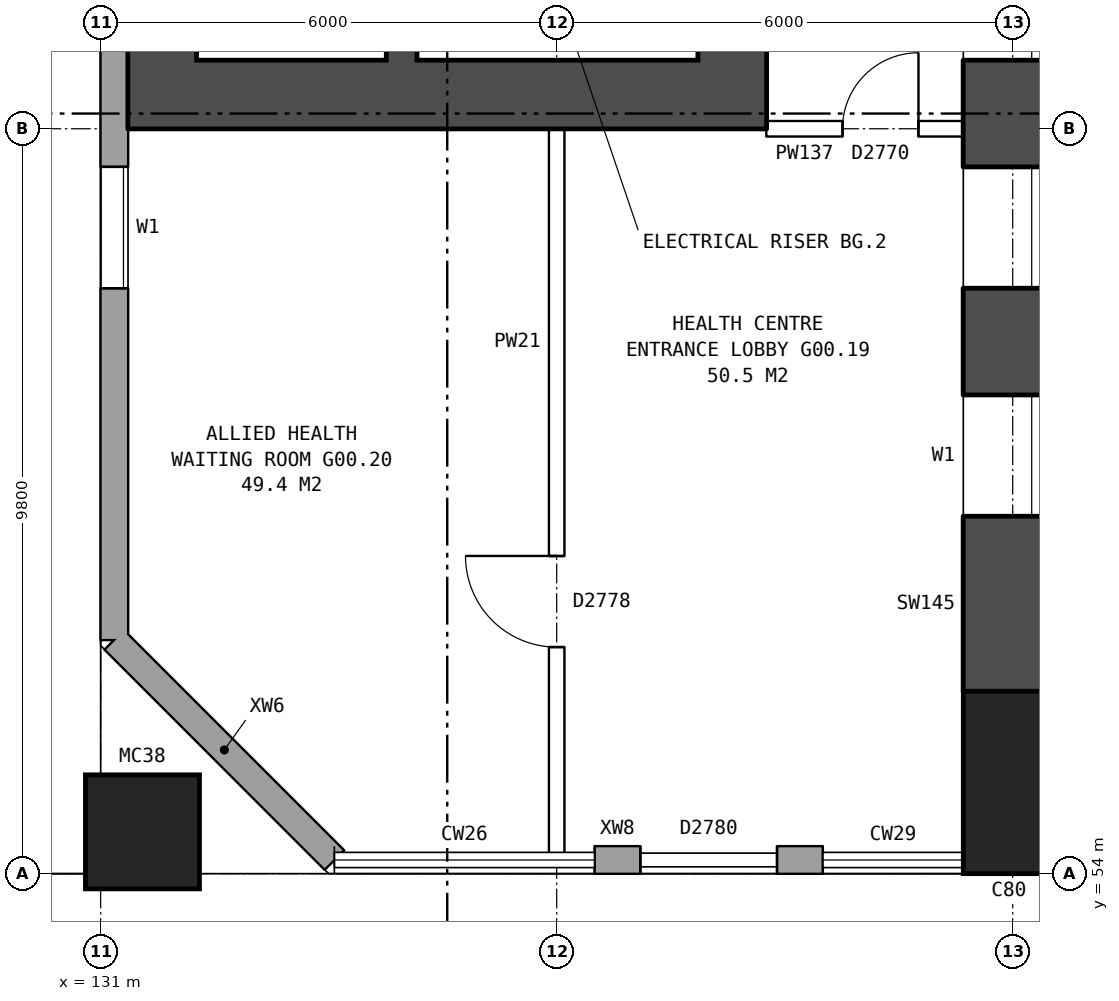
"""IFC4 building model, lengths in metres.
Left out: names, types, materials, properties, quantities, classifications, styles, units other than length and angle.
Written with IfcOpenShell. Run it as: python <this file> out.ifc"""

import sys

from ifc_helpers import new_model, si_unit, direction, frame, frame_2d, origin, origin_2d, place, context, subcontext, project, spatial, rectangle, hollow_rectangle, extrude, element, fill, save


model = new_model("IFC4")
c1 = context("Model", 3, precision=1e-05, world=origin(), true_north=direction((0.0, 1.0)))
c2 = subcontext(c1, "Body", "Model", "MODEL_VIEW")
j1 = project(units=[si_unit("LENGTHUNIT", "METRE"), si_unit("PLANEANGLEUNIT", "RADIAN")], contexts=[c1])
p1 = place(None, origin())
s1 = spatial("IfcSite", under=j1, at=p1, CompositionType="ELEMENT")
p2 = place(p1, origin())
s2 = spatial("IfcBuilding", under=s1, at=p2, CompositionType="ELEMENT")
p3 = place(p2, origin())
s3 = spatial("IfcBuildingStorey", under=s2, at=p3, CompositionType="ELEMENT", Elevation=0.0)
p4 = place(p3, frame((142.95, 55.2, -0.35), z_axis=(0.0, 0.0, 1.0), x_axis=(1.0, 0.0, 0.0)))
e1 = element("IfcColumn", 1, at=p4, inside=s3, PredefinedType="COLUMN", context=c2, shape_type="SweptSolid", body=[
    extrude(rectangle(XDim=1.2, YDim=2.4, at=origin_2d()), origin(), (0.0, 0.0, 1.0), 5.55),
])
p5 = place(p3, frame((142.95, 56.4, -0.35), z_axis=(0.0, 0.0, 1.0), x_axis=(0.0, 1.0, 0.0)))
e2 = element("IfcWall", 2, at=p5, inside=s3, PredefinedType="SHEAR", context=c2, shape_type="SweptSolid", body=[
    extrude(rectangle(XDim=27.2, YDim=1.2, at=frame_2d((13.6, 0.0))), origin(), (0.0, 0.0, 1.0), 5.55),
])
p6 = place(p5, frame((2.3, 0.0, 0.8)))
e3 = element("IfcOpeningElement", 3, at=p6, cuts=e2, PredefinedType="OPENING", context=c2, shape_type="SweptSolid", body=[
    extrude(rectangle(XDim=1.6, YDim=1.8, at=frame_2d((0.8, 0.9))), frame((0.0, 0.61, 0.0), z_axis=(0.0, -1.0, 0.0), x_axis=(1.0, 0.0, 0.0)), (0.0, 0.0, 1.0), 1.22),
])
p7 = place(p5, frame((5.3, 0.0, 0.8)))
e4 = element("IfcOpeningElement", 4, at=p7, cuts=e2, PredefinedType="OPENING", context=c2, shape_type="SweptSolid", body=[
    extrude(rectangle(XDim=1.6, YDim=1.8, at=frame_2d((0.8, 0.9))), frame((0.0, 0.61, 0.0), z_axis=(0.0, -1.0, 0.0), x_axis=(1.0, 0.0, 0.0)), (0.0, 0.0, 1.0), 1.22),
])
p8 = place(p5, frame((8.3, 0.0, 0.8)))
e5 = element("IfcOpeningElement", 5, at=p8, cuts=e2, PredefinedType="OPENING", context=c2, shape_type="SweptSolid", body=[
    extrude(rectangle(XDim=1.6, YDim=1.8, at=frame_2d((0.8, 0.9))), frame((0.0, 0.61, 0.0), z_axis=(0.0, -1.0, 0.0), x_axis=(1.0, 0.0, 0.0)), (0.0, 0.0, 1.0), 1.22),
])
p9 = place(p5, frame((11.3, 0.0, 0.8)))
e6 = element("IfcOpeningElement", 6, at=p9, cuts=e2, PredefinedType="OPENING", context=c2, shape_type="SweptSolid", body=[
    extrude(rectangle(XDim=1.6, YDim=1.8, at=frame_2d((0.8, 0.9))), frame((0.0, 0.61, 0.0), z_axis=(0.0, -1.0, 0.0), x_axis=(1.0, 0.0, 0.0)), (0.0, 0.0, 1.0), 1.22),
])
p10 = place(p5, frame((14.3, 0.0, 0.8)))
e7 = element("IfcOpeningElement", 7, at=p10, cuts=e2, PredefinedType="OPENING", context=c2, shape_type="SweptSolid", body=[
    extrude(rectangle(XDim=1.6, YDim=1.8, at=frame_2d((0.8, 0.9))), frame((0.0, 0.61, 0.0), z_axis=(0.0, -1.0, 0.0), x_axis=(1.0, 0.0, 0.0)), (0.0, 0.0, 1.0), 1.22),
])
p11 = place(p5, frame((17.3, 0.0, 0.8)))
e8 = element("IfcOpeningElement", 8, at=p11, cuts=e2, PredefinedType="OPENING", context=c2, shape_type="SweptSolid", body=[
    extrude(rectangle(XDim=1.6, YDim=1.8, at=frame_2d((0.8, 0.9))), frame((0.0, 0.61, 0.0), z_axis=(0.0, -1.0, 0.0), x_axis=(1.0, 0.0, 0.0)), (0.0, 0.0, 1.0), 1.22),
])
p12 = place(p5, frame((20.3, 0.0, 0.8)))
e9 = element("IfcOpeningElement", 9, at=p12, cuts=e2, PredefinedType="OPENING", context=c2, shape_type="SweptSolid", body=[
    extrude(rectangle(XDim=1.6, YDim=1.8, at=frame_2d((0.8, 0.9))), frame((0.0, 0.61, 0.0), z_axis=(0.0, -1.0, 0.0), x_axis=(1.0, 0.0, 0.0)), (0.0, 0.0, 1.0), 1.22),
])
p13 = place(p5, frame((23.3, 0.0, 0.8)))
e10 = element("IfcOpeningElement", 10, at=p13, cuts=e2, PredefinedType="OPENING", context=c2, shape_type="SweptSolid", body=[
    extrude(rectangle(XDim=1.6, YDim=1.8, at=frame_2d((0.8, 0.9))), frame((0.0, 0.61, 0.0), z_axis=(0.0, -1.0, 0.0), x_axis=(1.0, 0.0, 0.0)), (0.0, 0.0, 1.0), 1.22),
])
p14 = place(p3, frame((131.55, 54.55, -0.35), z_axis=(0.0, 0.0, 1.0), x_axis=(1.0, 0.0, 0.0)))
e11 = element("IfcColumn", 11, at=p14, inside=s3, PredefinedType="COLUMN", context=c2, shape_type="SweptSolid", body=[
    extrude(hollow_rectangle(XDim=1.5, YDim=1.5, WallThickness=0.08, at=origin_2d()), origin(), (0.0, 0.0, 1.0), 5.85),
])
p15 = place(p3, frame((131.18, 57.075, 0.0), z_axis=(0.0, 0.0, 1.0), x_axis=(0.707106781187, -0.707106781187, 0.0)))
e12 = element("IfcWall", 12, at=p15, inside=s3, PredefinedType="STANDARD", context=c2, shape_type="SweptSolid", body=[
    extrude(rectangle(XDim=4.094, YDim=0.36, at=frame_2d((2.047, 0.0))), origin(), (0.0, 0.0, 1.0), 5.2),
])
p16 = place(p3, frame((137.5, 54.18, 0.0), z_axis=(0.0, 0.0, 1.0), x_axis=(1.0, 0.0, 0.0)))
e13 = element("IfcWall", 13, at=p16, inside=s3, PredefinedType="STANDARD", context=c2, shape_type="SweptSolid", body=[
    extrude(rectangle(XDim=3.0, YDim=0.36, at=frame_2d((1.5, 0.0))), origin(), (0.0, 0.0, 1.0), 5.2),
])
p17 = place(p16, frame((0.6, 0.0, 0.0)))
e14 = element("IfcOpeningElement", 14, at=p17, cuts=e13, PredefinedType="OPENING", context=c2, shape_type="SweptSolid", body=[
    extrude(rectangle(XDim=1.8, YDim=2.4, at=frame_2d((0.9, 1.2))), frame((0.0, 0.19, 0.0), z_axis=(0.0, -1.0, 0.0), x_axis=(1.0, 0.0, 0.0)), (0.0, 0.0, 1.0), 0.38),
])
p18 = place(p3, frame((131.18, 82.925, 0.0), z_axis=(0.0, 0.0, 1.0), x_axis=(0.0, -1.0, 0.0)))
e15 = element("IfcWall", 15, at=p18, inside=s3, PredefinedType="STANDARD", context=c2, shape_type="SweptSolid", body=[
    extrude(rectangle(XDim=25.851, YDim=0.36, at=frame_2d((12.925, 0.0))), origin(), (0.0, 0.0, 1.0), 5.2),
])
p19 = place(p18, frame((19.625, 0.0, 0.8)))
e16 = element("IfcOpeningElement", 16, at=p19, cuts=e15, PredefinedType="OPENING", context=c2, shape_type="SweptSolid", body=[
    extrude(rectangle(XDim=1.6, YDim=1.8, at=frame_2d((0.8, 0.9))), frame((0.0, 0.19, 0.0), z_axis=(0.0, -1.0, 0.0), x_axis=(1.0, 0.0, 0.0)), (0.0, 0.0, 1.0), 0.38),
])
p20 = place(p18, frame((8.125, 0.0, 0.0)))
e17 = element("IfcOpeningElement", 17, at=p20, cuts=e15, PredefinedType="OPENING", context=c2, shape_type="SweptSolid", body=[
    extrude(rectangle(XDim=1.1, YDim=2.1, at=frame_2d((0.55, 1.05))), frame((0.0, 0.19, 0.0), z_axis=(0.0, -1.0, 0.0), x_axis=(1.0, 0.0, 0.0)), (0.0, 0.0, 1.0), 0.38),
])
p21 = place(p3, frame((139.31, 64.7, 0.0), z_axis=(0.0, 0.0, 1.0), x_axis=(0.0, 1.0, 0.0)))
e18 = element("IfcWall", 18, at=p21, inside=s3, PredefinedType="SHEAR", context=c2, shape_type="SweptSolid", body=[
    extrude(rectangle(XDim=10.6, YDim=0.9, at=frame_2d((5.3, 0.0))), origin(), (0.0, 0.0, 1.0), 5.2),
])
p22 = place(p21, frame((0.425, 0.0, 0.0)))
e19 = element("IfcOpeningElement", 19, at=p22, cuts=e18, PredefinedType="OPENING", context=c2, shape_type="SweptSolid", body=[
    extrude(rectangle(XDim=1.1, YDim=2.1, at=frame_2d((0.55, 1.05))), frame((0.0, 0.46, 0.0), z_axis=(0.0, -1.0, 0.0), x_axis=(1.0, 0.0, 0.0)), (0.0, 0.0, 1.0), 0.92),
])
p23 = place(p21, frame((2.7, 0.0, 0.0)))
e20 = element("IfcOpeningElement", 20, at=p23, cuts=e18, PredefinedType="OPENING", context=c2, shape_type="SweptSolid", body=[
    extrude(rectangle(XDim=1.1, YDim=2.1, at=frame_2d((0.55, 1.05))), frame((0.0, 0.46, 0.0), z_axis=(0.0, -1.0, 0.0), x_axis=(1.0, 0.0, 0.0)), (0.0, 0.0, 1.0), 0.92),
])
p24 = place(p21, frame((4.9, 0.0, 0.0)))
e21 = element("IfcOpeningElement", 21, at=p24, cuts=e18, PredefinedType="OPENING", context=c2, shape_type="SweptSolid", body=[
    extrude(rectangle(XDim=1.1, YDim=2.1, at=frame_2d((0.55, 1.05))), frame((0.0, 0.46, 0.0), z_axis=(0.0, -1.0, 0.0), x_axis=(1.0, 0.0, 0.0)), (0.0, 0.0, 1.0), 0.92),
])
p25 = place(p21, frame((9.0, 0.0, 0.0)))
e22 = element("IfcOpeningElement", 22, at=p25, cuts=e18, PredefinedType="OPENING", context=c2, shape_type="SweptSolid", body=[
    extrude(rectangle(XDim=1.1, YDim=2.1, at=frame_2d((0.55, 1.05))), frame((0.0, 0.46, 0.0), z_axis=(0.0, -1.0, 0.0), x_axis=(1.0, 0.0, 0.0)), (0.0, 0.0, 1.0), 0.92),
])
p26 = place(p21, frame((7.225, 0.0, 0.0)))
e23 = element("IfcOpeningElement", 23, at=p26, cuts=e18, PredefinedType="OPENING", context=c2, shape_type="SweptSolid", body=[
    extrude(rectangle(XDim=0.85, YDim=2.1, at=frame_2d((0.425, 1.05))), frame((0.0, 0.46, 0.0), z_axis=(0.0, -1.0, 0.0), x_axis=(1.0, 0.0, 0.0)), (0.0, 0.0, 1.0), 0.92),
])
p27 = place(p3, frame((131.81, 64.7, 0.0), z_axis=(0.0, 0.0, 1.0), x_axis=(0.0, 1.0, 0.0)))
e24 = element("IfcWall", 24, at=p27, inside=s3, PredefinedType="SHEAR", context=c2, shape_type="SweptSolid", body=[
    extrude(rectangle(XDim=10.6, YDim=0.9, at=frame_2d((5.3, 0.0))), origin(), (0.0, 0.0, 1.0), 5.2),
])
p28 = place(p27, frame((9.0, 0.0, 0.0)))
e25 = element("IfcOpeningElement", 25, at=p28, cuts=e24, PredefinedType="OPENING", context=c2, shape_type="SweptSolid", body=[
    extrude(rectangle(XDim=1.1, YDim=2.1, at=frame_2d((0.55, 1.05))), frame((0.0, 0.46, 0.0), z_axis=(0.0, -1.0, 0.0), x_axis=(1.0, 0.0, 0.0)), (0.0, 0.0, 1.0), 0.92),
])
p29 = place(p3, frame((139.76, 64.25, 0.0), z_axis=(0.0, 0.0, 1.0), x_axis=(-1.0, 0.0, 0.0)))
e26 = element("IfcWall", 26, at=p29, inside=s3, PredefinedType="SHEAR", context=c2, shape_type="SweptSolid", body=[
    extrude(rectangle(XDim=8.4, YDim=0.9, at=frame_2d((4.2, 0.0))), origin(), (0.0, 0.0, 1.0), 5.2),
])
p30 = place(p3, frame((134.96, 64.7, 0.0), z_axis=(0.0, 0.0, 1.0), x_axis=(0.0, 1.0, 0.0)))
e27 = element("IfcWall", 27, at=p30, inside=s3, PredefinedType="SHEAR", context=c2, shape_type="SweptSolid", body=[
    extrude(rectangle(XDim=6.35, YDim=0.4, at=frame_2d((3.175, 0.0))), origin(), (0.0, 0.0, 1.0), 5.2),
])
p31 = place(p3, frame((139.76, 63.8, 0.0), z_axis=(0.0, 0.0, 1.0), x_axis=(1.0, 0.0, 0.0)))
e28 = element("IfcWall", 28, at=p31, inside=s3, PredefinedType="PARTITIONING", context=c2, shape_type="SweptSolid", body=[
    extrude(rectangle(XDim=2.59, YDim=0.2, at=frame_2d((1.295, 0.0))), origin(), (0.0, 0.0, 1.0), 5.2),
])
p32 = place(p31, frame((1.0, 0.0, 0.0)))
e29 = element("IfcOpeningElement", 29, at=p32, cuts=e28, PredefinedType="OPENING", context=c2, shape_type="SweptSolid", body=[
    extrude(rectangle(XDim=1.0, YDim=2.1, at=frame_2d((0.5, 1.05))), frame((0.0, 0.11, 0.0), z_axis=(0.0, -1.0, 0.0), x_axis=(1.0, 0.0, 0.0)), (0.0, 0.0, 1.0), 0.22),
])
p33 = place(p3, frame((137.0, 54.24, 0.0), z_axis=(0.0, 0.0, 1.0), x_axis=(0.0, 1.0, 0.0)))
e30 = element("IfcWall", 30, at=p33, inside=s3, PredefinedType="PARTITIONING", context=c2, shape_type="SweptSolid", body=[
    extrude(rectangle(XDim=9.56, YDim=0.2, at=frame_2d((4.78, 0.0))), origin(), (0.0, 0.0, 1.0), 5.2),
])
p34 = place(p33, frame((2.74, 0.0, 0.0)))
e31 = element("IfcOpeningElement", 31, at=p34, cuts=e30, PredefinedType="OPENING", context=c2, shape_type="SweptSolid", body=[
    extrude(rectangle(XDim=1.2, YDim=2.1, at=frame_2d((0.6, 1.05))), frame((0.0, 0.11, 0.0), z_axis=(0.0, -1.0, 0.0), x_axis=(1.0, 0.0, 0.0)), (0.0, 0.0, 1.0), 0.22),
])
p35 = place(p17, frame((1.8, 0.0, 0.0), z_axis=(0.0, 0.0, 1.0), x_axis=(-1.0, 0.0, 0.0)))
e32 = element("IfcDoor", 32, at=p35, inside=s3, OperationType="DOUBLE_DOOR_SLIDING", PredefinedType="DOOR", context=c2, shape_type="SweptSolid", body=[
    extrude(rectangle(XDim=1.8, YDim=2.4, at=frame_2d((0.9, 1.2))), frame((0.0, 0.025, 0.0), z_axis=(0.0, -1.0, 0.0), x_axis=(1.0, 0.0, 0.0)), (0.0, 0.0, 1.0), 0.05),
])
fill(e14, e32)
p36 = place(p19, origin())
e33 = element("IfcWindow", 33, at=p36, inside=s3, PartitioningType="SINGLE_PANEL", PredefinedType="WINDOW", context=c2, shape_type="SweptSolid", body=[
    extrude(rectangle(XDim=1.6, YDim=1.8, at=frame_2d((0.8, 0.9))), frame((0.0, 0.15, 0.0), z_axis=(0.0, -1.0, 0.0), x_axis=(1.0, 0.0, 0.0)), (0.0, 0.0, 1.0), 0.06),
])
fill(e16, e33)
p37 = place(p6, origin())
e34 = element("IfcWindow", 34, at=p37, inside=s3, PartitioningType="SINGLE_PANEL", PredefinedType="WINDOW", context=c2, shape_type="SweptSolid", body=[
    extrude(rectangle(XDim=1.6, YDim=1.8, at=frame_2d((0.8, 0.9))), frame((0.0, -0.27, 0.0), z_axis=(0.0, -1.0, 0.0), x_axis=(1.0, 0.0, 0.0)), (0.0, 0.0, 1.0), 0.06),
])
fill(e3, e34)
p38 = place(p7, origin())
e35 = element("IfcWindow", 35, at=p38, inside=s3, PartitioningType="SINGLE_PANEL", PredefinedType="WINDOW", context=c2, shape_type="SweptSolid", body=[
    extrude(rectangle(XDim=1.6, YDim=1.8, at=frame_2d((0.8, 0.9))), frame((0.0, -0.27, 0.0), z_axis=(0.0, -1.0, 0.0), x_axis=(1.0, 0.0, 0.0)), (0.0, 0.0, 1.0), 0.06),
])
fill(e4, e35)
p39 = place(p8, origin())
e36 = element("IfcWindow", 36, at=p39, inside=s3, PartitioningType="SINGLE_PANEL", PredefinedType="WINDOW", context=c2, shape_type="SweptSolid", body=[
    extrude(rectangle(XDim=1.6, YDim=1.8, at=frame_2d((0.8, 0.9))), frame((0.0, -0.27, 0.0), z_axis=(0.0, -1.0, 0.0), x_axis=(1.0, 0.0, 0.0)), (0.0, 0.0, 1.0), 0.06),
])
fill(e5, e36)
p40 = place(p32, origin())
e37 = element("IfcDoor", 37, at=p40, inside=s3, OperationType="SINGLE_SWING_RIGHT", PredefinedType="DOOR", context=c2, shape_type="SweptSolid", body=[
    extrude(rectangle(XDim=1.0, YDim=2.1, at=frame_2d((0.5, 1.05))), frame((0.0, 0.025, 0.0), z_axis=(0.0, -1.0, 0.0), x_axis=(1.0, 0.0, 0.0)), (0.0, 0.0, 1.0), 0.05),
])
fill(e29, e37)
p41 = place(p34, origin())
e38 = element("IfcDoor", 38, at=p41, inside=s3, OperationType="SINGLE_SWING_RIGHT", PredefinedType="DOOR", context=c2, shape_type="SweptSolid", body=[
    extrude(rectangle(XDim=1.2, YDim=2.1, at=frame_2d((0.6, 1.05))), frame((0.0, 0.025, 0.0), z_axis=(0.0, -1.0, 0.0), x_axis=(1.0, 0.0, 0.0)), (0.0, 0.0, 1.0), 0.05),
])
fill(e31, e38)
save(model, sys.argv[1])
